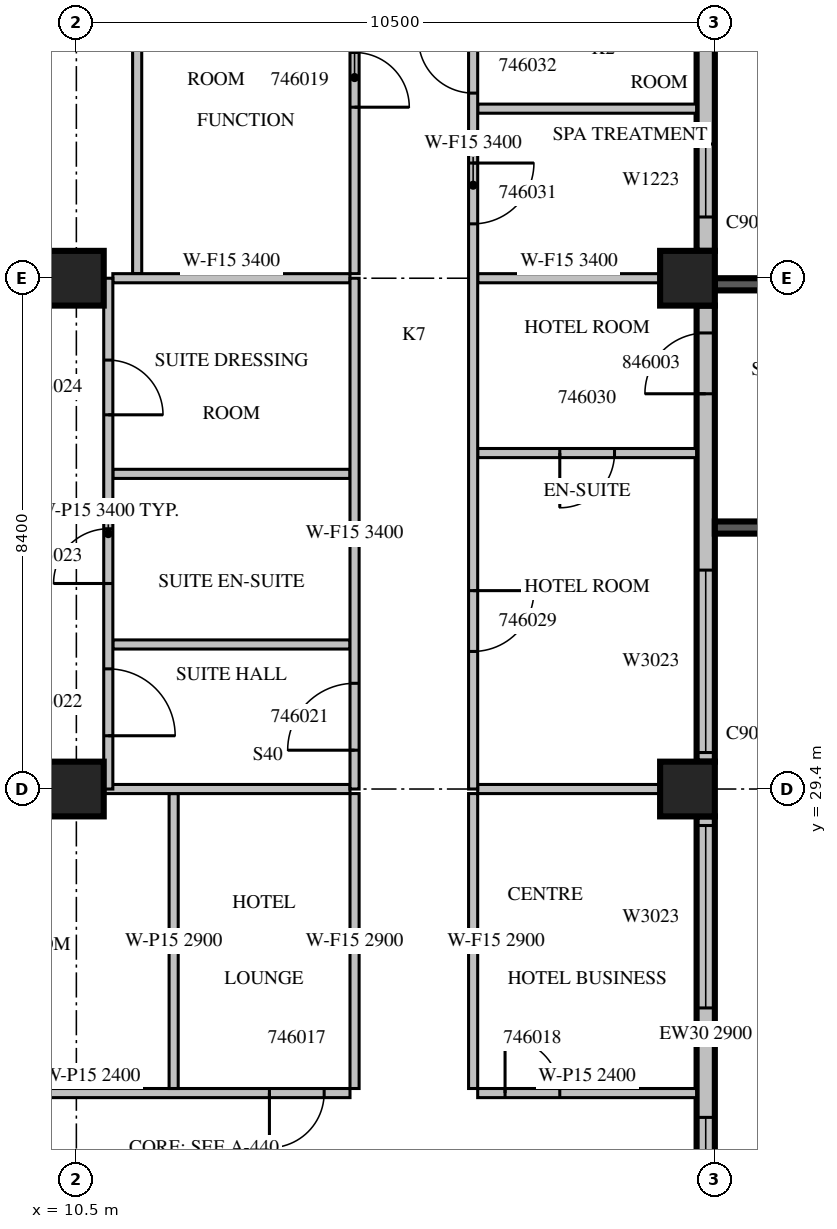
"""IFC4 building model, lengths in metres.
Left out: names, types, materials, properties, quantities, classifications, styles, units other than length and angle.
Written with IfcOpenShell. Run it as: python <this file> out.ifc"""

import sys

from ifc_helpers import new_model, si_unit, direction, frame, frame_2d, origin, origin_2d, place, context, subcontext, project, spatial, rectangle, extrude, source, transform, mapped, element, fill, save


model = new_model("IFC4")
c1 = context("Model", 3, precision=1e-05, world=origin(), true_north=direction((0.0, 1.0)))
c2 = subcontext(c1, "Body", "Model", "MODEL_VIEW")
j1 = project(units=[si_unit("LENGTHUNIT", "METRE"), si_unit("PLANEANGLEUNIT", "RADIAN")], contexts=[c1])
p1 = place(None, origin())
s1 = spatial("IfcSite", under=j1, at=p1, CompositionType="ELEMENT")
p2 = place(p1, origin())
s2 = spatial("IfcBuilding", under=s1, at=p2, CompositionType="ELEMENT")
p3 = place(p2, frame((0.0, 0.0, 208.2)))
s3 = spatial("IfcBuildingStorey", under=s2, at=p3, CompositionType="ELEMENT", Elevation=208.2)
m1 = source(origin(), c2, "Body", "SweptSolid", [
    extrude(rectangle(XDim=0.9, YDim=0.9, at=origin_2d()), origin(), (0.0, 0.0, 1.0), 3.8),
])
for number, where, z_axis, x_axis in (
    (1, (10.5, 29.4, 0.0), (0.0, 0.0, 1.0), (1.0, 0.0, 0.0)),
    (2, (20.55, 29.4, 0.0), (0.0, 0.0, 1.0), (1.0, 0.0, 0.0)),
    (3, (10.5, 37.8, 0.0), (0.0, 0.0, 1.0), (1.0, 0.0, 0.0)),
    (4, (20.55, 37.8, 0.0), (0.0, 0.0, 1.0), (1.0, 0.0, 0.0)),
):
    element("IfcColumn", number, at=place(p3, frame(where, z_axis=z_axis, x_axis=x_axis)), inside=s3, PredefinedType="COLUMN", context=c2, shape_type="MappedRepresentation", body=[
        mapped(m1, transform((0.0, 0.0, 0.0), scale=1.0)),
    ])
p4 = place(p3, frame((20.85, 21.8, 0.0), z_axis=(0.0, 0.0, 1.0), x_axis=(0.0, 1.0, 0.0)))
e5 = element("IfcWall", 5, at=p4, inside=s3, PredefinedType="STANDARD", context=c2, shape_type="SweptSolid", body=[
    extrude(rectangle(XDim=7.15, YDim=0.3, at=frame_2d((3.575, 0.0))), origin(), (0.0, 0.0, 1.0), 2.9),
])
m2 = source(origin(), c2, "Body", "SweptSolid", [
    extrude(rectangle(XDim=1.8, YDim=2.3, at=frame_2d((0.9, 1.15))), frame((0.0, 0.16, 0.0), z_axis=(0.0, -1.0, 0.0), x_axis=(1.0, 0.0, 0.0)), (0.0, 0.0, 1.0), 0.32),
])
p5 = place(p4, frame((0.4, 0.0, 0.6)))
e6 = element("IfcOpeningElement", 6, at=p5, cuts=e5, PredefinedType="OPENING", context=c2, shape_type="MappedRepresentation", body=[
    mapped(m2, transform((0.0, 0.0, 0.0), scale=1.0)),
])
m3 = source(origin(), c2, "Body", "SweptSolid", [
    extrude(rectangle(XDim=3.0, YDim=2.3, at=frame_2d((1.5, 1.15))), frame((0.0, 0.16, 0.0), z_axis=(0.0, -1.0, 0.0), x_axis=(1.0, 0.0, 0.0)), (0.0, 0.0, 1.0), 0.32),
])
p6 = place(p4, frame((4.0, 0.0, 0.6)))
e7 = element("IfcOpeningElement", 7, at=p6, cuts=e5, PredefinedType="OPENING", context=c2, shape_type="MappedRepresentation", body=[
    mapped(m3, transform((0.0, 0.0, 0.0), scale=1.0)),
])
m4 = source(origin(), c2, "Body", "SweptSolid", [
    extrude(rectangle(XDim=7.5, YDim=0.3, at=frame_2d((3.75, 0.0))), origin(), (0.0, 0.0, 1.0), 3.4),
])
p7 = place(p3, frame((20.85, 29.85, 0.0), z_axis=(0.0, 0.0, 1.0), x_axis=(0.0, 1.0, 0.0)))
e8 = element("IfcWall", 8, at=p7, inside=s3, PredefinedType="STANDARD", context=c2, shape_type="MappedRepresentation", body=[
    mapped(m4, transform((0.0, 0.0, 0.0), scale=1.0)),
])
p8 = place(p7, frame((0.15, 0.0, 0.6)))
e9 = element("IfcOpeningElement", 9, at=p8, cuts=e8, PredefinedType="OPENING", context=c2, shape_type="MappedRepresentation", body=[
    mapped(m3, transform((0.0, 0.0, 0.0), scale=1.0)),
])
m5 = source(origin(), c2, "Body", "SweptSolid", [
    extrude(rectangle(XDim=1.0, YDim=2.1, at=frame_2d((0.5, 1.05))), frame((0.0, 0.16, 0.0), z_axis=(0.0, -1.0, 0.0), x_axis=(1.0, 0.0, 0.0)), (0.0, 0.0, 1.0), 0.32),
])
p9 = place(p7, frame((6.05, 0.0, 0.0)))
e10 = element("IfcOpeningElement", 10, at=p9, cuts=e8, PredefinedType="OPENING", context=c2, shape_type="MappedRepresentation", body=[
    mapped(m5, transform((0.0, 0.0, 0.0), scale=1.0)),
])
m6 = source(origin(), c2, "Body", "SweptSolid", [
    extrude(rectangle(XDim=3.75, YDim=0.3, at=frame_2d((1.875, 0.0))), origin(), (0.0, 0.0, 1.0), 3.4),
])
p10 = place(p3, frame((20.85, 38.25, 0.0), z_axis=(0.0, 0.0, 1.0), x_axis=(0.0, 1.0, 0.0)))
e11 = element("IfcWall", 11, at=p10, inside=s3, PredefinedType="STANDARD", context=c2, shape_type="MappedRepresentation", body=[
    mapped(m6, transform((0.0, 0.0, 0.0), scale=1.0)),
])
m7 = source(origin(), c2, "Body", "SweptSolid", [
    extrude(rectangle(XDim=1.2, YDim=2.3, at=frame_2d((0.6, 1.15))), frame((0.0, 0.16, 0.0), z_axis=(0.0, -1.0, 0.0), x_axis=(1.0, 0.0, 0.0)), (0.0, 0.0, 1.0), 0.32),
])
p11 = place(p10, frame((0.557, 0.0, 0.6)))
e12 = element("IfcOpeningElement", 12, at=p11, cuts=e11, PredefinedType="OPENING", context=c2, shape_type="MappedRepresentation", body=[
    mapped(m7, transform((0.0, 0.0, 0.0), scale=1.0)),
])
m8 = source(origin(), c2, "Body", "SweptSolid", [
    extrude(rectangle(XDim=3.9, YDim=0.2, at=frame_2d((1.95, 0.0))), origin(), (0.0, 0.0, 1.0), 3.39),
])
p12 = place(p3, frame((21.0, 33.7, 0.0), z_axis=(0.0, 0.0, 1.0), x_axis=(1.0, 0.0, 0.0)))
e13 = element("IfcWall", 13, at=p12, inside=s3, PredefinedType="SOLIDWALL", context=c2, shape_type="MappedRepresentation", body=[
    mapped(m8, transform((0.0, 0.0, 0.0), scale=1.0)),
])
m9 = source(origin(), c2, "Body", "SweptSolid", [
    extrude(rectangle(XDim=2.4, YDim=2.3, at=frame_2d((1.2, 1.15))), frame((0.0, 0.11, 0.0), z_axis=(0.0, -1.0, 0.0), x_axis=(1.0, 0.0, 0.0)), (0.0, 0.0, 1.0), 0.22),
])
p13 = place(p12, frame((0.75, 0.0, 0.6)))
e14 = element("IfcOpeningElement", 14, at=p13, cuts=e13, PredefinedType="OPENING", context=c2, shape_type="MappedRepresentation", body=[
    mapped(m9, transform((0.0, 0.0, 0.0), scale=1.0)),
])
p14 = place(p3, frame((21.0, 37.7, 0.0), z_axis=(0.0, 0.0, 1.0), x_axis=(1.0, 0.0, 0.0)))
e15 = element("IfcWall", 15, at=p14, inside=s3, PredefinedType="SOLIDWALL", context=c2, shape_type="MappedRepresentation", body=[
    mapped(m8, transform((0.0, 0.0, 0.0), scale=1.0)),
])
p15 = place(p14, frame((0.75, 0.0, 0.6)))
e16 = element("IfcOpeningElement", 16, at=p15, cuts=e15, PredefinedType="OPENING", context=c2, shape_type="MappedRepresentation", body=[
    mapped(m9, transform((0.0, 0.0, 0.0), scale=1.0)),
])
p16 = place(p3, frame((6.505, 24.4, 0.0), z_axis=(0.0, 0.0, 1.0), x_axis=(1.0, 0.0, 0.0)))
e17 = element("IfcWall", 17, at=p16, inside=s3, PredefinedType="PARTITIONING", context=c2, shape_type="SweptSolid", body=[
    extrude(rectangle(XDim=8.495, YDim=0.15, at=frame_2d((4.247, 0.0))), origin(), (0.0, 0.0, 1.0), 2.4),
])
m10 = source(origin(), c2, "Body", "SweptSolid", [
    extrude(rectangle(XDim=0.9, YDim=2.1, at=frame_2d((0.45, 1.05))), frame((0.0, 0.085, 0.0), z_axis=(0.0, -1.0, 0.0), x_axis=(1.0, 0.0, 0.0)), (0.0, 0.0, 1.0), 0.17),
])
p17 = place(p16, frame((2.095, 0.0, 0.0)))
e18 = element("IfcOpeningElement", 18, at=p17, cuts=e17, PredefinedType="OPENING", context=c2, shape_type="MappedRepresentation", body=[
    mapped(m10, transform((0.0, 0.0, 0.0), scale=1.0)),
])
p18 = place(p16, frame((7.17, 0.0, 0.0)))
e19 = element("IfcOpeningElement", 19, at=p18, cuts=e17, PredefinedType="OPENING", context=c2, shape_type="MappedRepresentation", body=[
    mapped(m10, transform((0.0, 0.0, 0.0), scale=1.0)),
])
m11 = source(origin(), c2, "Body", "SweptSolid", [
    extrude(rectangle(XDim=3.6, YDim=0.15, at=frame_2d((1.8, 0.0))), origin(), (0.0, 0.0, 1.0), 2.4),
])
p19 = place(p3, frame((17.1, 24.4, 0.0), z_axis=(0.0, 0.0, 1.0), x_axis=(1.0, 0.0, 0.0)))
e20 = element("IfcWall", 20, at=p19, inside=s3, PredefinedType="PARTITIONING", context=c2, shape_type="MappedRepresentation", body=[
    mapped(m11, transform((0.0, 0.0, 0.0), scale=1.0)),
])
p20 = place(p19, frame((0.45, 0.0, 0.0)))
e21 = element("IfcOpeningElement", 21, at=p20, cuts=e20, PredefinedType="OPENING", context=c2, shape_type="MappedRepresentation", body=[
    mapped(m10, transform((0.0, 0.0, 0.0), scale=1.0)),
])
p21 = place(p3, frame((12.1, 24.475, 0.0), z_axis=(0.0, 0.0, 1.0), x_axis=(0.0, 1.0, 0.0)))
e22 = element("IfcWall", 22, at=p21, inside=s3, PredefinedType="PARTITIONING", context=c2, shape_type="SweptSolid", body=[
    extrude(rectangle(XDim=4.85, YDim=0.15, at=frame_2d((2.425, 0.0))), origin(), (0.0, 0.0, 1.0), 2.9),
])
m12 = source(origin(), c2, "Body", "SweptSolid", [
    extrude(rectangle(XDim=4.85, YDim=0.15, at=frame_2d((2.425, 0.0))), origin(), (0.0, 0.0, 1.0), 2.9),
])
for number, where, z_axis, x_axis in (
    (23, (15.075, 24.475, 0.0), (0.0, 0.0, 1.0), (0.0, 1.0, 0.0)),
    (24, (17.025, 29.325, 0.0), (0.0, 0.0, 1.0), (0.0, -1.0, 0.0)),
):
    element("IfcWall", number, at=place(p3, frame(where, z_axis=z_axis, x_axis=x_axis)), inside=s3, PredefinedType="PARTITIONING", context=c2, shape_type="MappedRepresentation", body=[
        mapped(m12, transform((0.0, 0.0, 0.0), scale=1.0)),
    ])
m13 = source(origin(), c2, "Body", "SweptSolid", [
    extrude(rectangle(XDim=4.051, YDim=0.15, at=frame_2d((2.026, 0.0))), origin(), (0.0, 0.0, 1.0), 3.4),
])
p22 = place(p3, frame((15.0, 29.4, 0.0), z_axis=(0.0, 0.0, 1.0), x_axis=(-1.0, 0.0, 0.0)))
e25 = element("IfcWall", 25, at=p22, inside=s3, PredefinedType="PARTITIONING", context=c2, shape_type="MappedRepresentation", body=[
    mapped(m13, transform((0.0, 0.0, 0.0), scale=1.0)),
])
m14 = source(origin(), c2, "Body", "SweptSolid", [
    extrude(rectangle(XDim=3.001, YDim=0.15, at=frame_2d((1.5, 0.0))), origin(), (0.0, 0.0, 1.0), 3.4),
])
p23 = place(p3, frame((20.101, 29.4, 0.0), z_axis=(0.0, 0.0, 1.0), x_axis=(-1.0, 0.0, 0.0)))
e26 = element("IfcWall", 26, at=p23, inside=s3, PredefinedType="PARTITIONING", context=c2, shape_type="MappedRepresentation", body=[
    mapped(m14, transform((0.0, 0.0, 0.0), scale=1.0)),
])
m15 = source(origin(), c2, "Body", "SweptSolid", [
    extrude(rectangle(XDim=6.45, YDim=0.15, at=frame_2d((3.225, 0.0))), origin(), (0.0, 0.0, 1.0), 3.4),
])
p24 = place(p3, frame((11.5, 44.325, 0.0), z_axis=(0.0, 0.0, 1.0), x_axis=(0.0, -1.0, 0.0)))
e27 = element("IfcWall", 27, at=p24, inside=s3, PredefinedType="PARTITIONING", context=c2, shape_type="MappedRepresentation", body=[
    mapped(m15, transform((0.0, 0.0, 0.0), scale=1.0)),
])
p25 = place(p3, frame((15.075, 37.875, 0.0), z_axis=(0.0, 0.0, 1.0), x_axis=(0.0, 1.0, 0.0)))
e28 = element("IfcWall", 28, at=p25, inside=s3, PredefinedType="PARTITIONING", context=c2, shape_type="MappedRepresentation", body=[
    mapped(m15, transform((0.0, 0.0, 0.0), scale=1.0)),
])
p26 = place(p25, frame((2.737, 0.0, 0.0)))
e29 = element("IfcOpeningElement", 29, at=p26, cuts=e28, PredefinedType="OPENING", context=c2, shape_type="MappedRepresentation", body=[
    mapped(m10, transform((0.0, 0.0, 0.0), scale=1.0)),
])
m16 = source(origin(), c2, "Body", "SweptSolid", [
    extrude(rectangle(XDim=3.9, YDim=0.15, at=frame_2d((1.95, 0.0))), origin(), (0.0, 0.0, 1.0), 3.4),
])
for number, where, z_axis, x_axis in (
    (30, (15.0, 31.777, 0.0), (0.0, 0.0, 1.0), (-1.0, 0.0, 0.0)),
    (31, (15.0, 34.583, 0.0), (0.0, 0.0, 1.0), (-1.0, 0.0, 0.0)),
    (32, (15.0, 37.8, 0.0), (0.0, 0.0, 1.0), (-1.0, 0.0, 0.0)),
):
    element("IfcWall", number, at=place(p3, frame(where, z_axis=z_axis, x_axis=x_axis)), inside=s3, PredefinedType="PARTITIONING", context=c2, shape_type="MappedRepresentation", body=[
        mapped(m16, transform((0.0, 0.0, 0.0), scale=1.0)),
    ])
m17 = source(origin(), c2, "Body", "SweptSolid", [
    extrude(rectangle(XDim=8.4, YDim=0.15, at=frame_2d((4.2, 0.0))), origin(), (0.0, 0.0, 1.0), 3.4),
])
p27 = place(p3, frame((11.025, 29.4, 0.0), z_axis=(0.0, 0.0, 1.0), x_axis=(0.0, 1.0, 0.0)))
e33 = element("IfcWall", 33, at=p27, inside=s3, PredefinedType="PARTITIONING", context=c2, shape_type="MappedRepresentation", body=[
    mapped(m17, transform((0.0, 0.0, 0.0), scale=1.0)),
])
m18 = source(origin(), c2, "Body", "SweptSolid", [
    extrude(rectangle(XDim=1.1, YDim=2.1, at=frame_2d((0.55, 1.05))), frame((0.0, 0.085, 0.0), z_axis=(0.0, -1.0, 0.0), x_axis=(1.0, 0.0, 0.0)), (0.0, 0.0, 1.0), 0.17),
])
p28 = place(p27, frame((0.876, 0.0, 0.0)))
e34 = element("IfcOpeningElement", 34, at=p28, cuts=e33, PredefinedType="OPENING", context=c2, shape_type="MappedRepresentation", body=[
    mapped(m18, transform((0.0, 0.0, 0.0), scale=1.0)),
])
p29 = place(p27, frame((3.38, 0.0, 0.0)))
e35 = element("IfcOpeningElement", 35, at=p29, cuts=e33, PredefinedType="OPENING", context=c2, shape_type="MappedRepresentation", body=[
    mapped(m10, transform((0.0, 0.0, 0.0), scale=1.0)),
])
p30 = place(p27, frame((6.154, 0.0, 0.0)))
e36 = element("IfcOpeningElement", 36, at=p30, cuts=e33, PredefinedType="OPENING", context=c2, shape_type="MappedRepresentation", body=[
    mapped(m10, transform((0.0, 0.0, 0.0), scale=1.0)),
])
m19 = source(origin(), c2, "Body", "SweptSolid", [
    extrude(rectangle(XDim=3.6, YDim=0.15, at=frame_2d((1.8, 0.0))), origin(), (0.0, 0.0, 1.0), 3.4),
])
p31 = place(p3, frame((17.1, 34.925, 0.0), z_axis=(0.0, 0.0, 1.0), x_axis=(1.0, 0.0, 0.0)))
e37 = element("IfcWall", 37, at=p31, inside=s3, PredefinedType="PARTITIONING", context=c2, shape_type="MappedRepresentation", body=[
    mapped(m19, transform((0.0, 0.0, 0.0), scale=1.0)),
])
p32 = place(p31, frame((1.35, 0.0, 0.0)))
e38 = element("IfcOpeningElement", 38, at=p32, cuts=e37, PredefinedType="OPENING", context=c2, shape_type="MappedRepresentation", body=[
    mapped(m10, transform((0.0, 0.0, 0.0), scale=1.0)),
])
p33 = place(p3, frame((17.1, 40.589, 0.0), z_axis=(0.0, 0.0, 1.0), x_axis=(1.0, 0.0, 0.0)))
e39 = element("IfcWall", 39, at=p33, inside=s3, PredefinedType="PARTITIONING", context=c2, shape_type="MappedRepresentation", body=[
    mapped(m19, transform((0.0, 0.0, 0.0), scale=1.0)),
])
p34 = place(p3, frame((20.101, 37.8, 0.0), z_axis=(0.0, 0.0, 1.0), x_axis=(-1.0, 0.0, 0.0)))
e40 = element("IfcWall", 40, at=p34, inside=s3, PredefinedType="PARTITIONING", context=c2, shape_type="MappedRepresentation", body=[
    mapped(m14, transform((0.0, 0.0, 0.0), scale=1.0)),
])
p35 = place(p3, frame((15.075, 29.4, 0.0), z_axis=(0.0, 0.0, 1.0), x_axis=(0.0, 1.0, 0.0)))
e41 = element("IfcWall", 41, at=p35, inside=s3, PredefinedType="PARTITIONING", context=c2, shape_type="MappedRepresentation", body=[
    mapped(m17, transform((0.0, 0.0, 0.0), scale=1.0)),
])
p36 = place(p35, frame((0.638, 0.0, 0.0)))
e42 = element("IfcOpeningElement", 42, at=p36, cuts=e41, PredefinedType="OPENING", context=c2, shape_type="MappedRepresentation", body=[
    mapped(m18, transform((0.0, 0.0, 0.0), scale=1.0)),
])
m20 = source(origin(), c2, "Body", "SweptSolid", [
    extrude(rectangle(XDim=19.86, YDim=0.15, at=frame_2d((9.93, 0.0))), origin(), (0.0, 0.0, 1.0), 3.4),
])
p37 = place(p3, frame((17.025, 49.26, 0.0), z_axis=(0.0, 0.0, 1.0), x_axis=(0.0, -1.0, 0.0)))
e43 = element("IfcWall", 43, at=p37, inside=s3, PredefinedType="PARTITIONING", context=c2, shape_type="MappedRepresentation", body=[
    mapped(m20, transform((0.0, 0.0, 0.0), scale=1.0)),
])
m21 = source(origin(), c2, "Body", "SweptSolid", [
    extrude(rectangle(XDim=1.0, YDim=2.1, at=frame_2d((0.5, 1.05))), frame((0.0, 0.085, 0.0), z_axis=(0.0, -1.0, 0.0), x_axis=(1.0, 0.0, 0.0)), (0.0, 0.0, 1.0), 0.17),
])
p38 = place(p37, frame((16.598, 0.0, 0.0)))
e44 = element("IfcOpeningElement", 44, at=p38, cuts=e43, PredefinedType="OPENING", context=c2, shape_type="MappedRepresentation", body=[
    mapped(m21, transform((0.0, 0.0, 0.0), scale=1.0)),
])
p39 = place(p37, frame((9.566, 0.0, 0.0)))
e45 = element("IfcOpeningElement", 45, at=p39, cuts=e43, PredefinedType="OPENING", context=c2, shape_type="MappedRepresentation", body=[
    mapped(m21, transform((0.0, 0.0, 0.0), scale=1.0)),
])
p40 = place(p37, frame((7.516, 0.0, 0.0)))
e46 = element("IfcOpeningElement", 46, at=p40, cuts=e43, PredefinedType="OPENING", context=c2, shape_type="MappedRepresentation", body=[
    mapped(m10, transform((0.0, 0.0, 0.0), scale=1.0)),
])
p41 = place(p37, frame((3.143, 0.0, 0.0)))
e47 = element("IfcOpeningElement", 47, at=p41, cuts=e43, PredefinedType="OPENING", context=c2, shape_type="MappedRepresentation", body=[
    mapped(m10, transform((0.0, 0.0, 0.0), scale=1.0)),
])
m22 = source(origin(), c2, "Body", "SweptSolid", [
    extrude(rectangle(XDim=1.8, YDim=2.3, at=frame_2d((0.9, 1.15))), frame((0.0, 0.03, 0.0), z_axis=(0.0, -1.0, 0.0), x_axis=(1.0, 0.0, 0.0)), (0.0, 0.0, 1.0), 0.06),
])
p42 = place(p5, origin())
e48 = element("IfcWindow", 48, at=p42, inside=s3, PartitioningType="SINGLE_PANEL", PredefinedType="WINDOW", context=c2, shape_type="MappedRepresentation", body=[
    mapped(m22, transform((0.0, 0.0, 0.0), scale=1.0)),
])
fill(e6, e48)
m23 = source(origin(), c2, "Body", "SweptSolid", [
    extrude(rectangle(XDim=3.0, YDim=2.3, at=frame_2d((1.5, 1.15))), frame((0.0, 0.03, 0.0), z_axis=(0.0, -1.0, 0.0), x_axis=(1.0, 0.0, 0.0)), (0.0, 0.0, 1.0), 0.06),
])
p43 = place(p6, origin())
e49 = element("IfcWindow", 49, at=p43, inside=s3, PartitioningType="SINGLE_PANEL", PredefinedType="WINDOW", context=c2, shape_type="MappedRepresentation", body=[
    mapped(m23, transform((0.0, 0.0, 0.0), scale=1.0)),
])
fill(e7, e49)
p44 = place(p8, origin())
e50 = element("IfcWindow", 50, at=p44, inside=s3, PartitioningType="SINGLE_PANEL", PredefinedType="WINDOW", context=c2, shape_type="MappedRepresentation", body=[
    mapped(m23, transform((0.0, 0.0, 0.0), scale=1.0)),
])
fill(e9, e50)
m24 = source(origin(), c2, "Body", "SweptSolid", [
    extrude(rectangle(XDim=1.2, YDim=2.3, at=frame_2d((0.6, 1.15))), frame((0.0, 0.03, 0.0), z_axis=(0.0, -1.0, 0.0), x_axis=(1.0, 0.0, 0.0)), (0.0, 0.0, 1.0), 0.06),
])
p45 = place(p11, origin())
e51 = element("IfcWindow", 51, at=p45, inside=s3, PartitioningType="SINGLE_PANEL", PredefinedType="WINDOW", context=c2, shape_type="MappedRepresentation", body=[
    mapped(m24, transform((0.0, 0.0, 0.0), scale=1.0)),
])
fill(e12, e51)
m25 = source(origin(), c2, "Body", "SweptSolid", [
    extrude(rectangle(XDim=0.9, YDim=2.1, at=frame_2d((0.45, 1.05))), frame((0.0, 0.025, 0.0), z_axis=(0.0, -1.0, 0.0), x_axis=(1.0, 0.0, 0.0)), (0.0, 0.0, 1.0), 0.05),
])
p46 = place(p18, origin())
e52 = element("IfcDoor", 52, at=p46, inside=s3, OperationType="SINGLE_SWING_RIGHT", PredefinedType="DOOR", context=c2, shape_type="MappedRepresentation", body=[
    mapped(m25, transform((0.0, 0.0, 0.0), scale=1.0)),
])
fill(e19, e52)
p47 = place(p20, origin())
e53 = element("IfcDoor", 53, at=p47, inside=s3, OperationType="SINGLE_SWING_LEFT", PredefinedType="DOOR", context=c2, shape_type="MappedRepresentation", body=[
    mapped(m25, transform((0.0, 0.0, 0.0), scale=1.0)),
])
fill(e21, e53)
p48 = place(p26, origin())
e54 = element("IfcDoor", 54, at=p48, inside=s3, OperationType="SINGLE_SWING_RIGHT", PredefinedType="DOOR", context=c2, shape_type="MappedRepresentation", body=[
    mapped(m25, transform((0.0, 0.0, 0.0), scale=1.0)),
])
fill(e29, e54)
m26 = source(origin(), c2, "Body", "SweptSolid", [
    extrude(rectangle(XDim=1.1, YDim=2.1, at=frame_2d((0.55, 1.05))), frame((0.0, 0.025, 0.0), z_axis=(0.0, -1.0, 0.0), x_axis=(1.0, 0.0, 0.0)), (0.0, 0.0, 1.0), 0.05),
])
p49 = place(p36, origin())
e55 = element("IfcDoor", 55, at=p49, inside=s3, OperationType="SINGLE_SWING_LEFT", PredefinedType="DOOR", context=c2, shape_type="MappedRepresentation", body=[
    mapped(m26, transform((0.0, 0.0, 0.0), scale=1.0)),
])
fill(e42, e55)
p50 = place(p28, origin())
e56 = element("IfcDoor", 56, at=p50, inside=s3, OperationType="SINGLE_SWING_RIGHT", PredefinedType="DOOR", context=c2, shape_type="MappedRepresentation", body=[
    mapped(m26, transform((0.0, 0.0, 0.0), scale=1.0)),
])
fill(e34, e56)
p51 = place(p29, origin())
e57 = element("IfcDoor", 57, at=p51, inside=s3, OperationType="SINGLE_SWING_LEFT", PredefinedType="DOOR", context=c2, shape_type="MappedRepresentation", body=[
    mapped(m25, transform((0.0, 0.0, 0.0), scale=1.0)),
])
fill(e35, e57)
p52 = place(p30, origin())
e58 = element("IfcDoor", 58, at=p52, inside=s3, OperationType="SINGLE_SWING_RIGHT", PredefinedType="DOOR", context=c2, shape_type="MappedRepresentation", body=[
    mapped(m25, transform((0.0, 0.0, 0.0), scale=1.0)),
])
fill(e36, e58)
m27 = source(origin(), c2, "Body", "SweptSolid", [
    extrude(rectangle(XDim=1.0, YDim=2.1, at=frame_2d((0.5, 1.05))), frame((0.0, 0.025, 0.0), z_axis=(0.0, -1.0, 0.0), x_axis=(1.0, 0.0, 0.0)), (0.0, 0.0, 1.0), 0.05),
])
p53 = place(p38, origin())
e59 = element("IfcDoor", 59, at=p53, inside=s3, OperationType="SINGLE_SWING_LEFT", PredefinedType="DOOR", context=c2, shape_type="MappedRepresentation", body=[
    mapped(m27, transform((0.0, 0.0, 0.0), scale=1.0)),
])
fill(e44, e59)
p54 = place(p32, origin())
e60 = element("IfcDoor", 60, at=p54, inside=s3, OperationType="SINGLE_SWING_RIGHT", PredefinedType="DOOR", context=c2, shape_type="MappedRepresentation", body=[
    mapped(m25, transform((0.0, 0.0, 0.0), scale=1.0)),
])
fill(e38, e60)
p55 = place(p39, origin())
e61 = element("IfcDoor", 61, at=p55, inside=s3, OperationType="SINGLE_SWING_LEFT", PredefinedType="DOOR", context=c2, shape_type="MappedRepresentation", body=[
    mapped(m27, transform((0.0, 0.0, 0.0), scale=1.0)),
])
fill(e45, e61)
p56 = place(p40, origin())
e62 = element("IfcDoor", 62, at=p56, inside=s3, OperationType="SINGLE_SWING_RIGHT", PredefinedType="DOOR", context=c2, shape_type="MappedRepresentation", body=[
    mapped(m25, transform((0.0, 0.0, 0.0), scale=1.0)),
])
fill(e46, e62)
p57 = place(p9, origin())
e63 = element("IfcDoor", 63, at=p57, inside=s3, OperationType="SINGLE_SWING_LEFT", PredefinedType="DOOR", context=c2, shape_type="MappedRepresentation", body=[
    mapped(m27, transform((0.0, 0.0, 0.0), scale=1.0)),
])
fill(e10, e63)
save(model, sys.argv[1])
